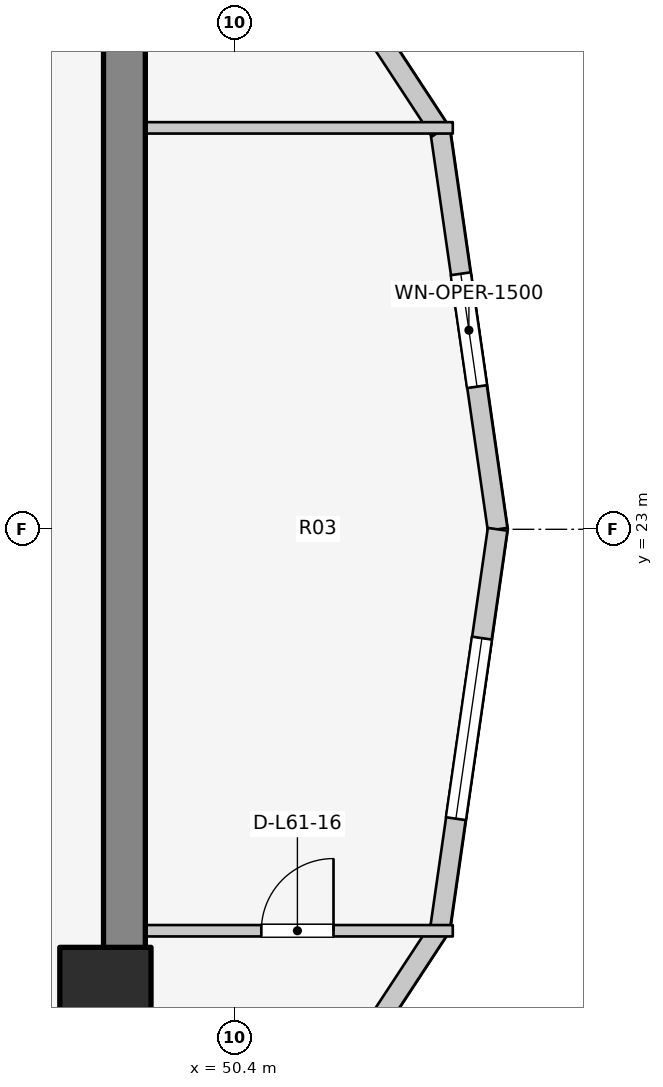
"""IFC4 building model, lengths in metres.
Left out: names, types, materials, properties, quantities, classifications, styles, units other than length and angle.
Written with IfcOpenShell. Run it as: python <this file> out.ifc"""

import sys

from ifc_helpers import new_model, si_unit, direction, frame, frame_2d, origin, origin_2d, place, context, subcontext, project, spatial, rectangle, extrude, element, fill, save


model = new_model("IFC4")
c1 = context("Model", 3, precision=1e-05, world=origin(), true_north=direction((0.0, 1.0)))
c2 = subcontext(c1, "Body", "Model", "MODEL_VIEW")
j1 = project(units=[si_unit("LENGTHUNIT", "METRE"), si_unit("PLANEANGLEUNIT", "RADIAN")], contexts=[c1])
p1 = place(None, origin())
s1 = spatial("IfcSite", under=j1, at=p1, CompositionType="ELEMENT")
p2 = place(p1, origin())
s2 = spatial("IfcBuilding", under=s1, at=p2, CompositionType="ELEMENT")
p3 = place(p2, frame((0.0, 0.0, 201.6)))
s3 = spatial("IfcBuildingStorey", under=s2, at=p3, CompositionType="ELEMENT", Elevation=201.6)
p4 = place(p3, frame((48.95, 17.05, 0.0), z_axis=(0.0, 0.0, 1.0), x_axis=(0.0, 1.0, 0.0)))
e1 = element("IfcWall", 1, at=p4, inside=s3, PredefinedType="SHEAR", context=c2, shape_type="SweptSolid", body=[
    extrude(rectangle(XDim=12.8, YDim=0.55, at=frame_2d((6.4, 0.0))), origin(), (0.0, 0.0, 1.0), 3.1),
])
p5 = place(p3, frame((48.7, 16.9, 0.0), z_axis=(0.0, 0.0, 1.0), x_axis=(1.0, 0.0, 0.0)))
e2 = element("IfcColumn", 2, at=p5, inside=s3, PredefinedType="COLUMN", context=c2, shape_type="SweptSolid", body=[
    extrude(rectangle(XDim=1.2, YDim=1.2, at=origin_2d()), origin(), (0.0, 0.0, 1.0), 3.1),
])
p6 = place(p3, frame((53.86, 23.0, 0.0), z_axis=(0.0, 0.0, 1.0), x_axis=(-0.142712754019, 0.989764148593, 0.0)))
e3 = element("IfcWall", 3, at=p6, inside=s3, PredefinedType="STANDARD", context=c2, shape_type="SweptSolid", body=[
    extrude(rectangle(XDim=5.293, YDim=0.26, at=frame_2d((2.646, 0.0))), origin(), (0.0, 0.0, 1.0), 2.85),
])
p7 = place(p6, frame((1.896, 0.0, 0.75)))
e4 = element("IfcOpeningElement", 4, at=p7, cuts=e3, PredefinedType="OPENING", context=c2, shape_type="SweptSolid", body=[
    extrude(rectangle(XDim=1.5, YDim=1.6, at=frame_2d((0.75, 0.8))), frame((0.0, 0.14, 0.0), z_axis=(0.0, -1.0, 0.0), x_axis=(1.0, 0.0, 0.0)), (0.0, 0.0, 1.0), 0.28),
])
p8 = place(p3, frame((53.105, 28.239, 0.0), z_axis=(0.0, 0.0, 1.0), x_axis=(-0.548776305075, 0.835969238064, 0.0)))
e5 = element("IfcWall", 5, at=p8, inside=s3, PredefinedType="STANDARD", context=c2, shape_type="SweptSolid", body=[
    extrude(rectangle(XDim=4.271, YDim=0.26, at=frame_2d((2.135, 0.0))), origin(), (0.0, 0.0, 1.0), 2.85),
])
p9 = place(p8, frame((1.385, 0.0, 0.75)))
e6 = element("IfcOpeningElement", 6, at=p9, cuts=e5, PredefinedType="OPENING", context=c2, shape_type="SweptSolid", body=[
    extrude(rectangle(XDim=1.5, YDim=1.6, at=frame_2d((0.75, 0.8))), frame((0.0, 0.14, 0.0), z_axis=(0.0, -1.0, 0.0), x_axis=(1.0, 0.0, 0.0)), (0.0, 0.0, 1.0), 0.28),
])
p10 = place(p3, frame((50.761, 14.191, 0.0), z_axis=(0.0, 0.0, 1.0), x_axis=(0.548776305075, 0.835969238064, 0.0)))
e7 = element("IfcWall", 7, at=p10, inside=s3, PredefinedType="STANDARD", context=c2, shape_type="SweptSolid", body=[
    extrude(rectangle(XDim=4.271, YDim=0.26, at=frame_2d((2.135, 0.0))), origin(), (0.0, 0.0, 1.0), 2.85),
])
p11 = place(p10, frame((1.385, 0.0, 0.75)))
e8 = element("IfcOpeningElement", 8, at=p11, cuts=e7, PredefinedType="OPENING", context=c2, shape_type="SweptSolid", body=[
    extrude(rectangle(XDim=1.5, YDim=1.6, at=frame_2d((0.75, 0.8))), frame((0.0, 0.14, 0.0), z_axis=(0.0, -1.0, 0.0), x_axis=(1.0, 0.0, 0.0)), (0.0, 0.0, 1.0), 0.28),
])
p12 = place(p3, frame((53.105, 17.761, 0.0), z_axis=(0.0, 0.0, 1.0), x_axis=(0.142712754019, 0.989764148593, 0.0)))
e9 = element("IfcWall", 9, at=p12, inside=s3, PredefinedType="STANDARD", context=c2, shape_type="SweptSolid", body=[
    extrude(rectangle(XDim=5.293, YDim=0.26, at=frame_2d((2.646, 0.0))), origin(), (0.0, 0.0, 1.0), 2.85),
])
p13 = place(p12, frame((1.447, 0.0, 0.75)))
e10 = element("IfcOpeningElement", 10, at=p13, cuts=e9, PredefinedType="OPENING", context=c2, shape_type="SweptSolid", body=[
    extrude(rectangle(XDim=2.4, YDim=1.7, at=frame_2d((1.2, 0.85))), frame((0.0, 0.14, 0.0), z_axis=(0.0, -1.0, 0.0), x_axis=(1.0, 0.0, 0.0)), (0.0, 0.0, 1.0), 0.28),
])
p14 = place(p3, frame((48.95, 17.719, 0.0), z_axis=(0.0, 0.0, 1.0), x_axis=(1.0, 0.0, 0.0)))
e11 = element("IfcWall", 11, at=p14, inside=s3, PredefinedType="PARTITIONING", context=c2, shape_type="SweptSolid", body=[
    extrude(rectangle(XDim=4.32, YDim=0.15, at=frame_2d((2.16, 0.0))), origin(), (0.0, 0.0, 1.0), 2.855),
])
p15 = place(p14, frame((1.801, 0.0, 0.0)))
e12 = element("IfcOpeningElement", 12, at=p15, cuts=e11, PredefinedType="OPENING", context=c2, shape_type="SweptSolid", body=[
    extrude(rectangle(XDim=0.95, YDim=2.1, at=frame_2d((0.475, 1.05))), frame((0.0, 0.085, 0.0), z_axis=(0.0, -1.0, 0.0), x_axis=(1.0, 0.0, 0.0)), (0.0, 0.0, 1.0), 0.17),
])
p16 = place(p3, frame((48.95, 28.281, 0.0), z_axis=(0.0, 0.0, 1.0), x_axis=(1.0, 0.0, 0.0)))
e13 = element("IfcWall", 13, at=p16, inside=s3, PredefinedType="PARTITIONING", context=c2, shape_type="SweptSolid", body=[
    extrude(rectangle(XDim=4.32, YDim=0.15, at=frame_2d((2.16, 0.0))), origin(), (0.0, 0.0, 1.0), 2.855),
])
p17 = place(p7, origin())
e14 = element("IfcWindow", 14, at=p17, inside=s3, PartitioningType="SINGLE_PANEL", PredefinedType="WINDOW", context=c2, shape_type="SweptSolid", body=[
    extrude(rectangle(XDim=1.5, YDim=1.6, at=frame_2d((0.75, 0.8))), frame((0.0, 0.03, 0.0), z_axis=(0.0, -1.0, 0.0), x_axis=(1.0, 0.0, 0.0)), (0.0, 0.0, 1.0), 0.06),
])
fill(e4, e14)
p18 = place(p13, origin())
e15 = element("IfcWindow", 15, at=p18, inside=s3, PartitioningType="SINGLE_PANEL", PredefinedType="WINDOW", context=c2, shape_type="SweptSolid", body=[
    extrude(rectangle(XDim=2.4, YDim=1.7, at=frame_2d((1.2, 0.85))), frame((0.0, 0.03, 0.0), z_axis=(0.0, -1.0, 0.0), x_axis=(1.0, 0.0, 0.0)), (0.0, 0.0, 1.0), 0.06),
])
fill(e10, e15)
p19 = place(p15, origin())
e16 = element("IfcDoor", 16, at=p19, inside=s3, OperationType="SINGLE_SWING_RIGHT", PredefinedType="DOOR", context=c2, shape_type="SweptSolid", body=[
    extrude(rectangle(XDim=0.95, YDim=2.1, at=frame_2d((0.475, 1.05))), frame((0.0, 0.025, 0.0), z_axis=(0.0, -1.0, 0.0), x_axis=(1.0, 0.0, 0.0)), (0.0, 0.0, 1.0), 0.05),
])
fill(e12, e16)
save(model, sys.argv[1])
